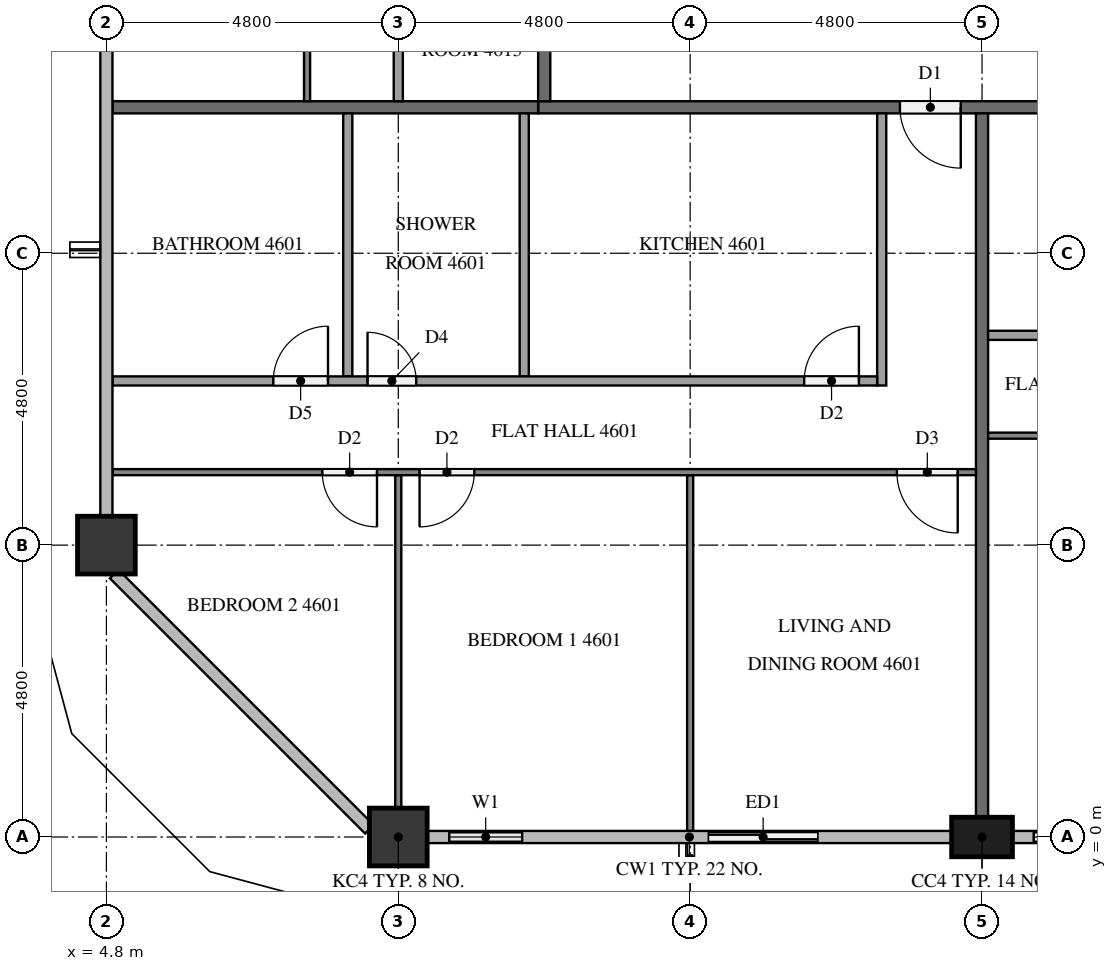
"""IFC4 building model, lengths in metres.
Left out: names, types, materials, properties, quantities, classifications, styles, units other than length and angle.
Written with IfcOpenShell. Run it as: python <this file> out.ifc"""

import sys

from ifc_helpers import new_model, si_unit, direction, frame, frame_2d, origin, origin_2d, place, context, subcontext, project, spatial, rectangle, extrude, element, fill, save


model = new_model("IFC4")
c1 = context("Model", 3, precision=1e-05, world=origin(), true_north=direction((0.0, 1.0)))
c2 = subcontext(c1, "Body", "Model", "MODEL_VIEW")
j1 = project(units=[si_unit("LENGTHUNIT", "METRE"), si_unit("PLANEANGLEUNIT", "RADIAN")], contexts=[c1])
p1 = place(None, origin())
s1 = spatial("IfcSite", under=j1, at=p1, CompositionType="ELEMENT")
p2 = place(p1, origin())
s2 = spatial("IfcBuilding", under=s1, at=p2, CompositionType="ELEMENT")
p3 = place(p2, frame((0.0, 0.0, 178.9)))
s3 = spatial("IfcBuildingStorey", under=s2, at=p3, CompositionType="ELEMENT", Elevation=178.9)
p4 = place(p3, frame((9.6, 0.0, 0.0), z_axis=(0.0, 0.0, 1.0), x_axis=(1.0, 0.0, 0.0)))
e1 = element("IfcColumn", 1, at=p4, inside=s3, PredefinedType="COLUMN", context=c2, shape_type="SweptSolid", body=[
    extrude(rectangle(XDim=0.95, YDim=0.95, at=origin_2d()), origin(), (0.0, 0.0, 1.0), 3.2),
])
p5 = place(p3, frame((19.2, 0.0, 0.0), z_axis=(0.0, 0.0, 1.0), x_axis=(1.0, 0.0, 0.0)))
e2 = element("IfcColumn", 2, at=p5, inside=s3, PredefinedType="COLUMN", context=c2, shape_type="SweptSolid", body=[
    extrude(rectangle(XDim=1.0, YDim=0.65, at=origin_2d()), origin(), (0.0, 0.0, 1.0), 3.2),
])
p6 = place(p3, frame((4.8, 4.8, 0.0), z_axis=(0.0, 0.0, 1.0), x_axis=(1.0, 0.0, 0.0)))
e3 = element("IfcColumn", 3, at=p6, inside=s3, PredefinedType="COLUMN", context=c2, shape_type="SweptSolid", body=[
    extrude(rectangle(XDim=0.95, YDim=0.95, at=origin_2d()), origin(), (0.0, 0.0, 1.0), 3.2),
])
p7 = place(p3, frame((10.075, 0.0, 0.0), z_axis=(0.0, 0.0, 1.0), x_axis=(1.0, 0.0, 0.0)))
e4 = element("IfcWall", 4, at=p7, inside=s3, PredefinedType="SOLIDWALL", context=c2, shape_type="SweptSolid", body=[
    extrude(rectangle(XDim=1.925, YDim=0.15, at=frame_2d((0.962, 0.0))), origin(), (0.0, 0.0, 1.0), 3.2),
])
p8 = place(p7, frame((0.363, 0.0, 0.9)))
e5 = element("IfcOpeningElement", 5, at=p8, cuts=e4, PredefinedType="OPENING", context=c2, shape_type="SweptSolid", body=[
    extrude(rectangle(XDim=1.2, YDim=1.4, at=frame_2d((0.6, 0.7))), frame((0.0, 0.085, 0.0), z_axis=(0.0, -1.0, 0.0), x_axis=(1.0, 0.0, 0.0)), (0.0, 0.0, 1.0), 0.17),
])
p9 = place(p3, frame((14.4, 0.0, 0.0), z_axis=(0.0, 0.0, 1.0), x_axis=(1.0, 0.0, 0.0)))
e6 = element("IfcWall", 6, at=p9, inside=s3, PredefinedType="SOLIDWALL", context=c2, shape_type="SweptSolid", body=[
    extrude(rectangle(XDim=2.4, YDim=0.15, at=frame_2d((1.2, 0.0))), origin(), (0.0, 0.0, 1.0), 3.2),
])
p10 = place(p9, frame((0.3, 0.0, 0.0)))
e7 = element("IfcOpeningElement", 7, at=p10, cuts=e6, PredefinedType="OPENING", context=c2, shape_type="SweptSolid", body=[
    extrude(rectangle(XDim=1.8, YDim=2.4, at=frame_2d((0.9, 1.2))), frame((0.0, 0.085, 0.0), z_axis=(0.0, -1.0, 0.0), x_axis=(1.0, 0.0, 0.0)), (0.0, 0.0, 1.0), 0.17),
])
p11 = place(p3, frame((19.7, 0.0, 0.0), z_axis=(0.0, 0.0, 1.0), x_axis=(1.0, 0.0, 0.0)))
e8 = element("IfcWall", 8, at=p11, inside=s3, PredefinedType="SOLIDWALL", context=c2, shape_type="SweptSolid", body=[
    extrude(rectangle(XDim=1.9, YDim=0.15, at=frame_2d((0.95, 0.0))), origin(), (0.0, 0.0, 1.0), 3.2),
])
p12 = place(p11, frame((0.35, 0.0, 0.9)))
e9 = element("IfcOpeningElement", 9, at=p12, cuts=e8, PredefinedType="OPENING", context=c2, shape_type="SweptSolid", body=[
    extrude(rectangle(XDim=1.2, YDim=1.4, at=frame_2d((0.6, 0.7))), frame((0.0, 0.085, 0.0), z_axis=(0.0, -1.0, 0.0), x_axis=(1.0, 0.0, 0.0)), (0.0, 0.0, 1.0), 0.17),
])
p13 = place(p3, frame((50.5, 12.0, 0.0), z_axis=(0.0, 0.0, 1.0), x_axis=(-1.0, 0.0, 0.0)))
e10 = element("IfcWall", 10, at=p13, inside=s3, PredefinedType="PARTITIONING", context=c2, shape_type="SweptSolid", body=[
    extrude(rectangle(XDim=38.6, YDim=0.2, at=frame_2d((19.3, 0.0))), origin(), (0.0, 0.0, 1.0), 3.2),
])
p14 = place(p13, frame((31.65, 0.0, 0.0)))
e11 = element("IfcOpeningElement", 11, at=p14, cuts=e10, PredefinedType="OPENING", context=c2, shape_type="SweptSolid", body=[
    extrude(rectangle(XDim=1.0, YDim=2.1, at=frame_2d((0.5, 1.05))), frame((0.0, 0.11, 0.0), z_axis=(0.0, -1.0, 0.0), x_axis=(1.0, 0.0, 0.0)), (0.0, 0.0, 1.0), 0.22),
])
p15 = place(p13, frame((17.25, 0.0, 0.0)))
e12 = element("IfcOpeningElement", 12, at=p15, cuts=e10, PredefinedType="OPENING", context=c2, shape_type="SweptSolid", body=[
    extrude(rectangle(XDim=1.0, YDim=2.1, at=frame_2d((0.5, 1.05))), frame((0.0, 0.11, 0.0), z_axis=(0.0, -1.0, 0.0), x_axis=(1.0, 0.0, 0.0)), (0.0, 0.0, 1.0), 0.22),
])
p16 = place(p13, frame((7.65, 0.0, 0.0)))
e13 = element("IfcOpeningElement", 13, at=p16, cuts=e10, PredefinedType="OPENING", context=c2, shape_type="SweptSolid", body=[
    extrude(rectangle(XDim=1.0, YDim=2.1, at=frame_2d((0.5, 1.05))), frame((0.0, 0.11, 0.0), z_axis=(0.0, -1.0, 0.0), x_axis=(1.0, 0.0, 0.0)), (0.0, 0.0, 1.0), 0.22),
])
p17 = place(p13, frame((5.9, 0.0, 0.0)))
e14 = element("IfcOpeningElement", 14, at=p17, cuts=e10, PredefinedType="OPENING", context=c2, shape_type="SweptSolid", body=[
    extrude(rectangle(XDim=1.1, YDim=2.1, at=frame_2d((0.55, 1.05))), frame((0.0, 0.11, 0.0), z_axis=(0.0, -1.0, 0.0), x_axis=(1.0, 0.0, 0.0)), (0.0, 0.0, 1.0), 0.22),
])
p18 = place(p3, frame((12.0, 12.1, 0.0), z_axis=(0.0, 0.0, 1.0), x_axis=(0.0, 1.0, 0.0)))
e15 = element("IfcWall", 15, at=p18, inside=s3, PredefinedType="PARTITIONING", context=c2, shape_type="SweptSolid", body=[
    extrude(rectangle(XDim=28.6, YDim=0.2, at=frame_2d((14.3, 0.0))), origin(), (0.0, 0.0, 1.0), 3.2),
])
p19 = place(p18, frame((26.65, 0.0, 0.0)))
e16 = element("IfcOpeningElement", 16, at=p19, cuts=e15, PredefinedType="OPENING", context=c2, shape_type="SweptSolid", body=[
    extrude(rectangle(XDim=1.0, YDim=2.1, at=frame_2d((0.5, 1.05))), frame((0.0, 0.11, 0.0), z_axis=(0.0, -1.0, 0.0), x_axis=(1.0, 0.0, 0.0)), (0.0, 0.0, 1.0), 0.22),
])
p20 = place(p18, frame((24.95, 0.0, 0.0)))
e17 = element("IfcOpeningElement", 17, at=p20, cuts=e15, PredefinedType="OPENING", context=c2, shape_type="SweptSolid", body=[
    extrude(rectangle(XDim=1.0, YDim=2.1, at=frame_2d((0.5, 1.05))), frame((0.0, 0.11, 0.0), z_axis=(0.0, -1.0, 0.0), x_axis=(1.0, 0.0, 0.0)), (0.0, 0.0, 1.0), 0.22),
])
p21 = place(p18, frame((12.95, 0.0, 0.0)))
e18 = element("IfcOpeningElement", 18, at=p21, cuts=e15, PredefinedType="OPENING", context=c2, shape_type="SweptSolid", body=[
    extrude(rectangle(XDim=1.0, YDim=2.1, at=frame_2d((0.5, 1.05))), frame((0.0, 0.11, 0.0), z_axis=(0.0, -1.0, 0.0), x_axis=(1.0, 0.0, 0.0)), (0.0, 0.0, 1.0), 0.22),
])
p22 = place(p3, frame((19.2, 11.9, 0.0), z_axis=(0.0, 0.0, 1.0), x_axis=(0.0, -1.0, 0.0)))
e19 = element("IfcWall", 19, at=p22, inside=s3, PredefinedType="PARTITIONING", context=c2, shape_type="SweptSolid", body=[
    extrude(rectangle(XDim=11.575, YDim=0.2, at=frame_2d((5.788, 0.0))), origin(), (0.0, 0.0, 1.0), 3.2),
])
p23 = place(p3, frame((4.9, 12.0, 0.0), z_axis=(0.0, 0.0, 1.0), x_axis=(1.0, 0.0, 0.0)))
e20 = element("IfcWall", 20, at=p23, inside=s3, PredefinedType="PARTITIONING", context=c2, shape_type="SweptSolid", body=[
    extrude(rectangle(XDim=7.0, YDim=0.2, at=frame_2d((3.5, 0.0))), origin(), (0.0, 0.0, 1.0), 3.2),
])
p24 = place(p3, frame((14.4, 5.95, 0.0), z_axis=(0.0, 0.0, 1.0), x_axis=(0.0, -1.0, 0.0)))
e21 = element("IfcWall", 21, at=p24, inside=s3, PredefinedType="PARTITIONING", context=c2, shape_type="SweptSolid", body=[
    extrude(rectangle(XDim=5.85, YDim=0.1, at=frame_2d((2.925, 0.0))), origin(), (0.0, 0.0, 1.0), 3.2),
])
p25 = place(p3, frame((9.6, 5.95, 0.0), z_axis=(0.0, 0.0, 1.0), x_axis=(0.0, -1.0, 0.0)))
e22 = element("IfcWall", 22, at=p25, inside=s3, PredefinedType="PARTITIONING", context=c2, shape_type="SweptSolid", body=[
    extrude(rectangle(XDim=5.475, YDim=0.1, at=frame_2d((2.737, 0.0))), origin(), (0.0, 0.0, 1.0), 3.2),
])
p26 = place(p3, frame((19.1, 6.0, 0.0), z_axis=(0.0, 0.0, 1.0), x_axis=(-1.0, 0.0, 0.0)))
e23 = element("IfcWall", 23, at=p26, inside=s3, PredefinedType="PARTITIONING", context=c2, shape_type="SweptSolid", body=[
    extrude(rectangle(XDim=14.2, YDim=0.1, at=frame_2d((7.1, 0.0))), origin(), (0.0, 0.0, 1.0), 3.2),
])
p27 = place(p26, frame((0.3, 0.0, 0.0)))
e24 = element("IfcOpeningElement", 24, at=p27, cuts=e23, PredefinedType="OPENING", context=c2, shape_type="SweptSolid", body=[
    extrude(rectangle(XDim=1.0, YDim=2.1, at=frame_2d((0.5, 1.05))), frame((0.0, 0.06, 0.0), z_axis=(0.0, -1.0, 0.0), x_axis=(1.0, 0.0, 0.0)), (0.0, 0.0, 1.0), 0.12),
])
p28 = place(p26, frame((8.25, 0.0, 0.0)))
e25 = element("IfcOpeningElement", 25, at=p28, cuts=e23, PredefinedType="OPENING", context=c2, shape_type="SweptSolid", body=[
    extrude(rectangle(XDim=0.9, YDim=2.1, at=frame_2d((0.45, 1.05))), frame((0.0, 0.06, 0.0), z_axis=(0.0, -1.0, 0.0), x_axis=(1.0, 0.0, 0.0)), (0.0, 0.0, 1.0), 0.12),
])
p29 = place(p26, frame((9.85, 0.0, 0.0)))
e26 = element("IfcOpeningElement", 26, at=p29, cuts=e23, PredefinedType="OPENING", context=c2, shape_type="SweptSolid", body=[
    extrude(rectangle(XDim=0.9, YDim=2.1, at=frame_2d((0.45, 1.05))), frame((0.0, 0.06, 0.0), z_axis=(0.0, -1.0, 0.0), x_axis=(1.0, 0.0, 0.0)), (0.0, 0.0, 1.0), 0.12),
])
for number, where, z_axis, x_axis in (
    (27, (11.671, 11.9, 0.0), (0.0, 0.0, 1.0), (0.0, -1.0, 0.0)),
    (28, (8.769, 11.9, 0.0), (0.0, 0.0, 1.0), (0.0, -1.0, 0.0)),
):
    element("IfcWall", number, at=place(p3, frame(where, z_axis=z_axis, x_axis=x_axis)), inside=s3, PredefinedType="PARTITIONING", context=c2, shape_type="SweptSolid", body=[
        extrude(rectangle(XDim=4.325, YDim=0.15, at=frame_2d((2.163, 0.0))), origin(), (0.0, 0.0, 1.0), 3.2),
    ])
p30 = place(p3, frame((17.55, 11.9, 0.0), z_axis=(0.0, 0.0, 1.0), x_axis=(0.0, -1.0, 0.0)))
e29 = element("IfcWall", 29, at=p30, inside=s3, PredefinedType="PARTITIONING", context=c2, shape_type="SweptSolid", body=[
    extrude(rectangle(XDim=4.475, YDim=0.15, at=frame_2d((2.237, 0.0))), origin(), (0.0, 0.0, 1.0), 3.2),
])
p31 = place(p3, frame((4.9, 7.5, 0.0), z_axis=(0.0, 0.0, 1.0), x_axis=(1.0, 0.0, 0.0)))
e30 = element("IfcWall", 30, at=p31, inside=s3, PredefinedType="PARTITIONING", context=c2, shape_type="SweptSolid", body=[
    extrude(rectangle(XDim=12.575, YDim=0.15, at=frame_2d((6.288, 0.0))), origin(), (0.0, 0.0, 1.0), 3.2),
])
p32 = place(p31, frame((11.375, 0.0, 0.0)))
e31 = element("IfcOpeningElement", 31, at=p32, cuts=e30, PredefinedType="OPENING", context=c2, shape_type="SweptSolid", body=[
    extrude(rectangle(XDim=0.9, YDim=2.1, at=frame_2d((0.45, 1.05))), frame((0.0, 0.085, 0.0), z_axis=(0.0, -1.0, 0.0), x_axis=(1.0, 0.0, 0.0)), (0.0, 0.0, 1.0), 0.17),
])
p33 = place(p31, frame((4.194, 0.0, 0.0)))
e32 = element("IfcOpeningElement", 32, at=p33, cuts=e30, PredefinedType="OPENING", context=c2, shape_type="SweptSolid", body=[
    extrude(rectangle(XDim=0.8, YDim=2.1, at=frame_2d((0.4, 1.05))), frame((0.0, 0.085, 0.0), z_axis=(0.0, -1.0, 0.0), x_axis=(1.0, 0.0, 0.0)), (0.0, 0.0, 1.0), 0.17),
])
p34 = place(p31, frame((2.644, 0.0, 0.0)))
e33 = element("IfcOpeningElement", 33, at=p34, cuts=e30, PredefinedType="OPENING", context=c2, shape_type="SweptSolid", body=[
    extrude(rectangle(XDim=0.9, YDim=2.1, at=frame_2d((0.45, 1.05))), frame((0.0, 0.085, 0.0), z_axis=(0.0, -1.0, 0.0), x_axis=(1.0, 0.0, 0.0)), (0.0, 0.0, 1.0), 0.17),
])
p35 = place(p3, frame((33.5, 6.6, 0.0), z_axis=(0.0, 0.0, 1.0), x_axis=(-1.0, 0.0, 0.0)))
e34 = element("IfcWall", 34, at=p35, inside=s3, PredefinedType="PARTITIONING", context=c2, shape_type="SweptSolid", body=[
    extrude(rectangle(XDim=14.2, YDim=0.1, at=frame_2d((7.1, 0.0))), origin(), (0.0, 0.0, 1.0), 3.2),
])
p36 = place(p35, frame((0.3, 0.0, 0.0)))
e35 = element("IfcOpeningElement", 35, at=p36, cuts=e34, PredefinedType="OPENING", context=c2, shape_type="SweptSolid", body=[
    extrude(rectangle(XDim=0.9, YDim=2.1, at=frame_2d((0.45, 1.05))), frame((0.0, 0.06, 0.0), z_axis=(0.0, -1.0, 0.0), x_axis=(1.0, 0.0, 0.0)), (0.0, 0.0, 1.0), 0.12),
])
p37 = place(p35, frame((8.15, 0.0, 0.0)))
e36 = element("IfcOpeningElement", 36, at=p37, cuts=e34, PredefinedType="OPENING", context=c2, shape_type="SweptSolid", body=[
    extrude(rectangle(XDim=1.0, YDim=2.1, at=frame_2d((0.5, 1.05))), frame((0.0, 0.06, 0.0), z_axis=(0.0, -1.0, 0.0), x_axis=(1.0, 0.0, 0.0)), (0.0, 0.0, 1.0), 0.12),
])
p38 = place(p35, frame((9.85, 0.0, 0.0)))
e37 = element("IfcOpeningElement", 37, at=p38, cuts=e34, PredefinedType="OPENING", context=c2, shape_type="SweptSolid", body=[
    extrude(rectangle(XDim=0.9, YDim=2.1, at=frame_2d((0.45, 1.05))), frame((0.0, 0.06, 0.0), z_axis=(0.0, -1.0, 0.0), x_axis=(1.0, 0.0, 0.0)), (0.0, 0.0, 1.0), 0.12),
])
p39 = place(p3, frame((19.3, 8.25, 0.0), z_axis=(0.0, 0.0, 1.0), x_axis=(1.0, 0.0, 0.0)))
e38 = element("IfcWall", 38, at=p39, inside=s3, PredefinedType="PARTITIONING", context=c2, shape_type="SweptSolid", body=[
    extrude(rectangle(XDim=12.575, YDim=0.15, at=frame_2d((6.288, 0.0))), origin(), (0.0, 0.0, 1.0), 3.2),
])
p40 = place(p39, frame((11.475, 0.0, 0.0)))
e39 = element("IfcOpeningElement", 39, at=p40, cuts=e38, PredefinedType="OPENING", context=c2, shape_type="SweptSolid", body=[
    extrude(rectangle(XDim=0.8, YDim=2.1, at=frame_2d((0.4, 1.05))), frame((0.0, 0.085, 0.0), z_axis=(0.0, -1.0, 0.0), x_axis=(1.0, 0.0, 0.0)), (0.0, 0.0, 1.0), 0.17),
])
p41 = place(p39, frame((6.129, 0.0, 0.0)))
e40 = element("IfcOpeningElement", 40, at=p41, cuts=e38, PredefinedType="OPENING", context=c2, shape_type="SweptSolid", body=[
    extrude(rectangle(XDim=0.9, YDim=2.1, at=frame_2d((0.45, 1.05))), frame((0.0, 0.085, 0.0), z_axis=(0.0, -1.0, 0.0), x_axis=(1.0, 0.0, 0.0)), (0.0, 0.0, 1.0), 0.17),
])
p42 = place(p39, frame((4.579, 0.0, 0.0)))
e41 = element("IfcOpeningElement", 41, at=p42, cuts=e38, PredefinedType="OPENING", context=c2, shape_type="SweptSolid", body=[
    extrude(rectangle(XDim=0.9, YDim=2.1, at=frame_2d((0.45, 1.05))), frame((0.0, 0.085, 0.0), z_axis=(0.0, -1.0, 0.0), x_axis=(1.0, 0.0, 0.0)), (0.0, 0.0, 1.0), 0.17),
])
p43 = place(p3, frame((8.1, 12.1, 0.0), z_axis=(0.0, 0.0, 1.0), x_axis=(0.0, 1.0, 0.0)))
e42 = element("IfcWall", 42, at=p43, inside=s3, PredefinedType="PARTITIONING", context=c2, shape_type="SweptSolid", body=[
    extrude(rectangle(XDim=14.2, YDim=0.1, at=frame_2d((7.1, 0.0))), origin(), (0.0, 0.0, 1.0), 3.2),
])
p44 = place(p43, frame((13.0, 0.0, 0.0)))
e43 = element("IfcOpeningElement", 43, at=p44, cuts=e42, PredefinedType="OPENING", context=c2, shape_type="SweptSolid", body=[
    extrude(rectangle(XDim=0.9, YDim=2.1, at=frame_2d((0.45, 1.05))), frame((0.0, 0.06, 0.0), z_axis=(0.0, -1.0, 0.0), x_axis=(1.0, 0.0, 0.0)), (0.0, 0.0, 1.0), 0.12),
])
p45 = place(p43, frame((5.05, 0.0, 0.0)))
e44 = element("IfcOpeningElement", 44, at=p45, cuts=e42, PredefinedType="OPENING", context=c2, shape_type="SweptSolid", body=[
    extrude(rectangle(XDim=1.0, YDim=2.1, at=frame_2d((0.5, 1.05))), frame((0.0, 0.06, 0.0), z_axis=(0.0, -1.0, 0.0), x_axis=(1.0, 0.0, 0.0)), (0.0, 0.0, 1.0), 0.12),
])
p46 = place(p43, frame((3.45, 0.0, 0.0)))
e45 = element("IfcOpeningElement", 45, at=p46, cuts=e42, PredefinedType="OPENING", context=c2, shape_type="SweptSolid", body=[
    extrude(rectangle(XDim=0.9, YDim=2.1, at=frame_2d((0.45, 1.05))), frame((0.0, 0.06, 0.0), z_axis=(0.0, -1.0, 0.0), x_axis=(1.0, 0.0, 0.0)), (0.0, 0.0, 1.0), 0.12),
])
p47 = place(p3, frame((9.6, 24.675, 0.0), z_axis=(0.0, 0.0, 1.0), x_axis=(0.0, -1.0, 0.0)))
e46 = element("IfcWall", 46, at=p47, inside=s3, PredefinedType="PARTITIONING", context=c2, shape_type="SweptSolid", body=[
    extrude(rectangle(XDim=12.575, YDim=0.15, at=frame_2d((6.288, 0.0))), origin(), (0.0, 0.0, 1.0), 3.2),
])
p48 = place(p47, frame((0.3, 0.0, 0.0)))
e47 = element("IfcOpeningElement", 47, at=p48, cuts=e46, PredefinedType="OPENING", context=c2, shape_type="SweptSolid", body=[
    extrude(rectangle(XDim=0.9, YDim=2.1, at=frame_2d((0.45, 1.05))), frame((0.0, 0.085, 0.0), z_axis=(0.0, -1.0, 0.0), x_axis=(1.0, 0.0, 0.0)), (0.0, 0.0, 1.0), 0.17),
])
p49 = place(p47, frame((8.448, 0.0, 0.0)))
e48 = element("IfcOpeningElement", 48, at=p49, cuts=e46, PredefinedType="OPENING", context=c2, shape_type="SweptSolid", body=[
    extrude(rectangle(XDim=0.9, YDim=2.1, at=frame_2d((0.45, 1.05))), frame((0.0, 0.085, 0.0), z_axis=(0.0, -1.0, 0.0), x_axis=(1.0, 0.0, 0.0)), (0.0, 0.0, 1.0), 0.17),
])
p50 = place(p47, frame((9.998, 0.0, 0.0)))
e49 = element("IfcOpeningElement", 49, at=p50, cuts=e46, PredefinedType="OPENING", context=c2, shape_type="SweptSolid", body=[
    extrude(rectangle(XDim=0.8, YDim=2.1, at=frame_2d((0.4, 1.05))), frame((0.0, 0.085, 0.0), z_axis=(0.0, -1.0, 0.0), x_axis=(1.0, 0.0, 0.0)), (0.0, 0.0, 1.0), 0.17),
])
p51 = place(p8, origin())
e50 = element("IfcWindow", 50, at=p51, inside=s3, PartitioningType="SINGLE_PANEL", PredefinedType="WINDOW", context=c2, shape_type="SweptSolid", body=[
    extrude(rectangle(XDim=1.2, YDim=1.4, at=frame_2d((0.6, 0.7))), frame((0.0, 0.03, 0.0), z_axis=(0.0, -1.0, 0.0), x_axis=(1.0, 0.0, 0.0)), (0.0, 0.0, 1.0), 0.06),
])
fill(e5, e50)
p52 = place(p10, origin())
e51 = element("IfcDoor", 51, at=p52, inside=s3, OperationType="SLIDING_TO_LEFT", PredefinedType="DOOR", context=c2, shape_type="SweptSolid", body=[
    extrude(rectangle(XDim=1.8, YDim=2.4, at=frame_2d((0.9, 1.2))), frame((0.0, 0.025, 0.0), z_axis=(0.0, -1.0, 0.0), x_axis=(1.0, 0.0, 0.0)), (0.0, 0.0, 1.0), 0.05),
])
fill(e7, e51)
p53 = place(p12, origin())
e52 = element("IfcWindow", 52, at=p53, inside=s3, PartitioningType="SINGLE_PANEL", PredefinedType="WINDOW", context=c2, shape_type="SweptSolid", body=[
    extrude(rectangle(XDim=1.2, YDim=1.4, at=frame_2d((0.6, 0.7))), frame((0.0, 0.03, 0.0), z_axis=(0.0, -1.0, 0.0), x_axis=(1.0, 0.0, 0.0)), (0.0, 0.0, 1.0), 0.06),
])
fill(e9, e52)
p54 = place(p14, origin())
e53 = element("IfcDoor", 53, at=p54, inside=s3, OperationType="SINGLE_SWING_LEFT", PredefinedType="DOOR", context=c2, shape_type="SweptSolid", body=[
    extrude(rectangle(XDim=1.0, YDim=2.1, at=frame_2d((0.5, 1.05))), frame((0.0, 0.025, 0.0), z_axis=(0.0, -1.0, 0.0), x_axis=(1.0, 0.0, 0.0)), (0.0, 0.0, 1.0), 0.05),
])
fill(e11, e53)
p55 = place(p27, origin())
e54 = element("IfcDoor", 54, at=p55, inside=s3, OperationType="SINGLE_SWING_LEFT", PredefinedType="DOOR", context=c2, shape_type="SweptSolid", body=[
    extrude(rectangle(XDim=1.0, YDim=2.1, at=frame_2d((0.5, 1.05))), frame((0.0, 0.025, 0.0), z_axis=(0.0, -1.0, 0.0), x_axis=(1.0, 0.0, 0.0)), (0.0, 0.0, 1.0), 0.05),
])
fill(e24, e54)
p56 = place(p28, origin())
e55 = element("IfcDoor", 55, at=p56, inside=s3, OperationType="SINGLE_SWING_RIGHT", PredefinedType="DOOR", context=c2, shape_type="SweptSolid", body=[
    extrude(rectangle(XDim=0.9, YDim=2.1, at=frame_2d((0.45, 1.05))), frame((0.0, 0.025, 0.0), z_axis=(0.0, -1.0, 0.0), x_axis=(1.0, 0.0, 0.0)), (0.0, 0.0, 1.0), 0.05),
])
fill(e25, e55)
p57 = place(p29, origin())
e56 = element("IfcDoor", 56, at=p57, inside=s3, OperationType="SINGLE_SWING_LEFT", PredefinedType="DOOR", context=c2, shape_type="SweptSolid", body=[
    extrude(rectangle(XDim=0.9, YDim=2.1, at=frame_2d((0.45, 1.05))), frame((0.0, 0.025, 0.0), z_axis=(0.0, -1.0, 0.0), x_axis=(1.0, 0.0, 0.0)), (0.0, 0.0, 1.0), 0.05),
])
fill(e26, e56)
p58 = place(p32, origin())
e57 = element("IfcDoor", 57, at=p58, inside=s3, OperationType="SINGLE_SWING_RIGHT", PredefinedType="DOOR", context=c2, shape_type="SweptSolid", body=[
    extrude(rectangle(XDim=0.9, YDim=2.1, at=frame_2d((0.45, 1.05))), frame((0.0, 0.025, 0.0), z_axis=(0.0, -1.0, 0.0), x_axis=(1.0, 0.0, 0.0)), (0.0, 0.0, 1.0), 0.05),
])
fill(e31, e57)
p59 = place(p33, origin())
e58 = element("IfcDoor", 58, at=p59, inside=s3, OperationType="SINGLE_SWING_LEFT", PredefinedType="DOOR", context=c2, shape_type="SweptSolid", body=[
    extrude(rectangle(XDim=0.8, YDim=2.1, at=frame_2d((0.4, 1.05))), frame((0.0, 0.025, 0.0), z_axis=(0.0, -1.0, 0.0), x_axis=(1.0, 0.0, 0.0)), (0.0, 0.0, 1.0), 0.05),
])
fill(e32, e58)
p60 = place(p34, origin())
e59 = element("IfcDoor", 59, at=p60, inside=s3, OperationType="SINGLE_SWING_RIGHT", PredefinedType="DOOR", context=c2, shape_type="SweptSolid", body=[
    extrude(rectangle(XDim=0.9, YDim=2.1, at=frame_2d((0.45, 1.05))), frame((0.0, 0.025, 0.0), z_axis=(0.0, -1.0, 0.0), x_axis=(1.0, 0.0, 0.0)), (0.0, 0.0, 1.0), 0.05),
])
fill(e33, e59)
save(model, sys.argv[1])
